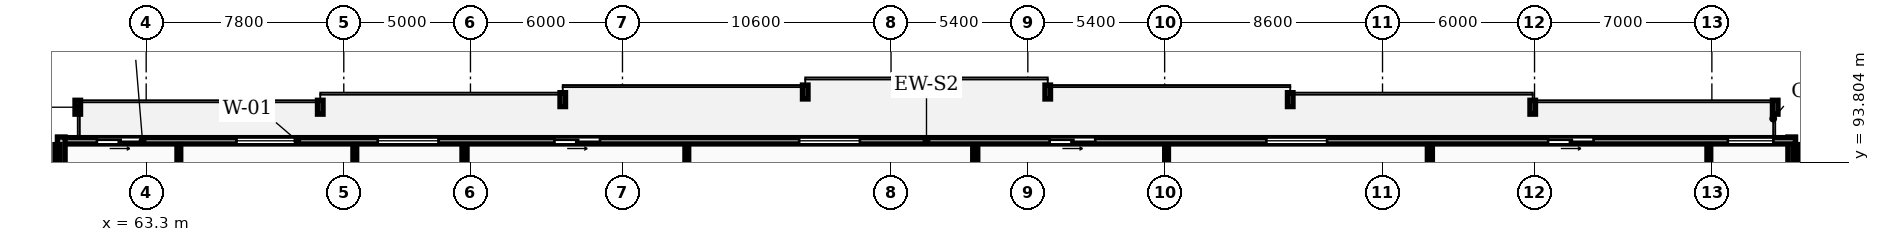
"""IFC4 building model, lengths in metres.
Left out: names, types, materials, properties, quantities, classifications, styles, units other than length and angle.
Written with IfcOpenShell. Run it as: python <this file> out.ifc"""

import sys

from ifc_helpers import new_model, si_unit, direction, frame, frame_2d, origin, place, context, subcontext, project, spatial, rectangle, extrude, element, fill, save


model = new_model("IFC4")
c1 = context("Model", 3, precision=1e-05, world=origin(), true_north=direction((0.0, 1.0)))
c2 = subcontext(c1, "Body", "Model", "MODEL_VIEW")
j1 = project(units=[si_unit("LENGTHUNIT", "METRE"), si_unit("PLANEANGLEUNIT", "RADIAN")], contexts=[c1])
p1 = place(None, origin())
s1 = spatial("IfcSite", under=j1, at=p1, CompositionType="ELEMENT")
p2 = place(p1, origin())
s2 = spatial("IfcBuilding", under=s1, at=p2, CompositionType="ELEMENT")
p3 = place(p2, frame((0.0, 0.0, 242.45)))
s3 = spatial("IfcBuildingStorey", under=s2, at=p3, CompositionType="ELEMENT", Elevation=242.45)
p4 = place(p3, frame((128.25, 91.2, 0.0), z_axis=(0.0, 0.0, 1.0), x_axis=(0.0, 1.0, 0.0)))
e1 = element("IfcWall", 1, at=p4, inside=s3, PredefinedType="STANDARD", context=c2, shape_type="SweptSolid", body=[
    extrude(rectangle(XDim=3.6, YDim=0.3, at=frame_2d((1.8, 0.0))), origin(), (0.0, 0.0, 1.0), 3.17),
])
p5 = place(p3, frame((128.4, 94.65, 0.0), z_axis=(0.0, 0.0, 1.0), x_axis=(-1.0, 0.0, 0.0)))
e2 = element("IfcWall", 2, at=p5, inside=s3, PredefinedType="STANDARD", context=c2, shape_type="SweptSolid", body=[
    extrude(rectangle(XDim=68.6, YDim=0.25, at=frame_2d((34.3, 0.0))), origin(), (0.0, 0.0, 1.0), 3.17),
])
p6 = place(p5, frame((59.137, 0.0, 0.85)))
e3 = element("IfcOpeningElement", 3, at=p6, cuts=e2, PredefinedType="OPENING", context=c2, shape_type="SweptSolid", body=[
    extrude(rectangle(XDim=2.4, YDim=1.9, at=frame_2d((1.2, 0.95))), frame((0.0, 0.135, 0.0), z_axis=(0.0, -1.0, 0.0), x_axis=(1.0, 0.0, 0.0)), (0.0, 0.0, 1.0), 0.27),
])
p7 = place(p5, frame((65.245, 0.0, 0.0)))
e4 = element("IfcOpeningElement", 4, at=p7, cuts=e2, PredefinedType="OPENING", context=c2, shape_type="SweptSolid", body=[
    extrude(rectangle(XDim=1.8, YDim=2.2, at=frame_2d((0.9, 1.1))), frame((0.0, 0.135, 0.0), z_axis=(0.0, -1.0, 0.0), x_axis=(1.0, 0.0, 0.0)), (0.0, 0.0, 1.0), 0.27),
])
p8 = place(p5, frame((53.56, 0.0, 0.85)))
e5 = element("IfcOpeningElement", 5, at=p8, cuts=e2, PredefinedType="OPENING", context=c2, shape_type="SweptSolid", body=[
    extrude(rectangle(XDim=2.4, YDim=1.9, at=frame_2d((1.2, 0.95))), frame((0.0, 0.135, 0.0), z_axis=(0.0, -1.0, 0.0), x_axis=(1.0, 0.0, 0.0)), (0.0, 0.0, 1.0), 0.27),
])
p9 = place(p5, frame((47.188, 0.0, 0.0)))
e6 = element("IfcOpeningElement", 6, at=p9, cuts=e2, PredefinedType="OPENING", context=c2, shape_type="SweptSolid", body=[
    extrude(rectangle(XDim=1.8, YDim=2.2, at=frame_2d((0.9, 1.1))), frame((0.0, 0.135, 0.0), z_axis=(0.0, -1.0, 0.0), x_axis=(1.0, 0.0, 0.0)), (0.0, 0.0, 1.0), 0.27),
])
p10 = place(p5, frame((36.928, 0.0, 0.85)))
e7 = element("IfcOpeningElement", 7, at=p10, cuts=e2, PredefinedType="OPENING", context=c2, shape_type="SweptSolid", body=[
    extrude(rectangle(XDim=2.4, YDim=1.9, at=frame_2d((1.2, 0.95))), frame((0.0, 0.135, 0.0), z_axis=(0.0, -1.0, 0.0), x_axis=(1.0, 0.0, 0.0)), (0.0, 0.0, 1.0), 0.27),
])
p11 = place(p5, frame((27.64, 0.0, 0.0)))
e8 = element("IfcOpeningElement", 8, at=p11, cuts=e2, PredefinedType="OPENING", context=c2, shape_type="SweptSolid", body=[
    extrude(rectangle(XDim=1.8, YDim=2.2, at=frame_2d((0.9, 1.1))), frame((0.0, 0.135, 0.0), z_axis=(0.0, -1.0, 0.0), x_axis=(1.0, 0.0, 0.0)), (0.0, 0.0, 1.0), 0.27),
])
p12 = place(p5, frame((18.487, 0.0, 0.85)))
e9 = element("IfcOpeningElement", 9, at=p12, cuts=e2, PredefinedType="OPENING", context=c2, shape_type="SweptSolid", body=[
    extrude(rectangle(XDim=2.4, YDim=1.9, at=frame_2d((1.2, 0.95))), frame((0.0, 0.135, 0.0), z_axis=(0.0, -1.0, 0.0), x_axis=(1.0, 0.0, 0.0)), (0.0, 0.0, 1.0), 0.27),
])
p13 = place(p5, frame((7.966, 0.0, 0.0)))
e10 = element("IfcOpeningElement", 10, at=p13, cuts=e2, PredefinedType="OPENING", context=c2, shape_type="SweptSolid", body=[
    extrude(rectangle(XDim=1.8, YDim=2.2, at=frame_2d((0.9, 1.1))), frame((0.0, 0.135, 0.0), z_axis=(0.0, -1.0, 0.0), x_axis=(1.0, 0.0, 0.0)), (0.0, 0.0, 1.0), 0.27),
])
p14 = place(p5, frame((0.87, 0.0, 0.85)))
e11 = element("IfcOpeningElement", 11, at=p14, cuts=e2, PredefinedType="OPENING", context=c2, shape_type="SweptSolid", body=[
    extrude(rectangle(XDim=1.8, YDim=1.8, at=frame_2d((0.9, 0.9))), frame((0.0, 0.135, 0.0), z_axis=(0.0, -1.0, 0.0), x_axis=(1.0, 0.0, 0.0)), (0.0, 0.0, 1.0), 0.27),
])
p15 = place(p3, frame((59.95, 94.8, 0.0), z_axis=(0.0, 0.0, 1.0), x_axis=(0.0, -1.0, 0.0)))
e12 = element("IfcWall", 12, at=p15, inside=s3, PredefinedType="STANDARD", context=c2, shape_type="SweptSolid", body=[
    extrude(rectangle(XDim=3.6, YDim=0.3, at=frame_2d((1.8, 0.0))), origin(), (0.0, 0.0, 1.0), 3.17),
])
for number, where, z_axis, x_axis in (
    (13, (59.8, 70.18, 0.0), (0.0, 0.0, 1.0), (0.0, 1.0, 0.0)),
    (14, (128.4, 70.18, 0.0), (0.0, 0.0, 1.0), (0.0, 1.0, 0.0)),
    (15, (75.865, 70.18, 0.0), (0.0, 0.0, 1.0), (0.0, 1.0, 0.0)),
):
    element("IfcWall", number, at=place(p3, frame(where, z_axis=z_axis, x_axis=x_axis)), inside=s3, PredefinedType="PARTITIONING", context=c2, shape_type="SweptSolid", body=[
        extrude(rectangle(XDim=24.32, YDim=0.2, at=frame_2d((12.16, 0.0))), origin(), (0.0, 0.0, 1.0), 2.477),
    ])
p16 = place(p3, frame((64.59, 84.54, 0.0), z_axis=(0.0, 0.0, 1.0), x_axis=(0.0, 1.0, 0.0)))
e16 = element("IfcWall", 16, at=p16, inside=s3, PredefinedType="PARTITIONING", context=c2, shape_type="SweptSolid", body=[
    extrude(rectangle(XDim=9.96, YDim=0.15, at=frame_2d((4.98, 0.0))), origin(), (0.0, 0.0, 1.0), 3.17),
])
p17 = place(p16, frame((3.82, 0.0, 0.0)))
e17 = element("IfcOpeningElement", 17, at=p17, cuts=e16, PredefinedType="OPENING", context=c2, shape_type="SweptSolid", body=[
    extrude(rectangle(XDim=0.92, YDim=2.08, at=frame_2d((0.46, 1.04))), frame((0.0, 0.085, 0.0), z_axis=(0.0, -1.0, 0.0), x_axis=(1.0, 0.0, 0.0)), (0.0, 0.0, 1.0), 0.17),
])
p18 = place(p3, frame((71.535, 87.16, 0.0), z_axis=(0.0, 0.0, 1.0), x_axis=(0.0, 1.0, 0.0)))
e18 = element("IfcWall", 18, at=p18, inside=s3, PredefinedType="PARTITIONING", context=c2, shape_type="SweptSolid", body=[
    extrude(rectangle(XDim=7.34, YDim=0.15, at=frame_2d((3.67, 0.0))), origin(), (0.0, 0.0, 1.0), 3.17),
])
p19 = place(p18, frame((1.2, 0.0, 0.0)))
e19 = element("IfcOpeningElement", 19, at=p19, cuts=e18, PredefinedType="OPENING", context=c2, shape_type="SweptSolid", body=[
    extrude(rectangle(XDim=0.92, YDim=2.08, at=frame_2d((0.46, 1.04))), frame((0.0, 0.085, 0.0), z_axis=(0.0, -1.0, 0.0), x_axis=(1.0, 0.0, 0.0)), (0.0, 0.0, 1.0), 0.17),
])
p20 = place(p3, frame((96.024, 70.18, 0.0), z_axis=(0.0, 0.0, 1.0), x_axis=(0.0, 1.0, 0.0)))
e20 = element("IfcWall", 20, at=p20, inside=s3, PredefinedType="PARTITIONING", context=c2, shape_type="SweptSolid", body=[
    extrude(rectangle(XDim=24.32, YDim=0.2, at=frame_2d((12.16, 0.0))), origin(), (0.0, 0.0, 1.0), 3.17),
])
p21 = place(p3, frame((84.64, 89.68, 0.0), z_axis=(0.0, 0.0, 1.0), x_axis=(0.0, 1.0, 0.0)))
e21 = element("IfcWall", 21, at=p21, inside=s3, PredefinedType="PARTITIONING", context=c2, shape_type="SweptSolid", body=[
    extrude(rectangle(XDim=4.82, YDim=0.15, at=frame_2d((2.41, 0.0))), origin(), (0.0, 0.0, 1.0), 2.477),
])
p22 = place(p3, frame((113.969, 70.18, 0.0), z_axis=(0.0, 0.0, 1.0), x_axis=(0.0, 1.0, 0.0)))
e22 = element("IfcWall", 22, at=p22, inside=s3, PredefinedType="PARTITIONING", context=c2, shape_type="SweptSolid", body=[
    extrude(rectangle(XDim=24.32, YDim=0.2, at=frame_2d((12.16, 0.0))), origin(), (0.0, 0.0, 1.0), 3.17),
])
p23 = place(p3, frame((103.576, 89.68, 0.0), z_axis=(0.0, 0.0, 1.0), x_axis=(0.0, 1.0, 0.0)))
e23 = element("IfcWall", 23, at=p23, inside=s3, PredefinedType="PARTITIONING", context=c2, shape_type="SweptSolid", body=[
    extrude(rectangle(XDim=4.82, YDim=0.15, at=frame_2d((2.41, 0.0))), origin(), (0.0, 0.0, 1.0), 3.17),
])
p24 = place(p3, frame((124.98, 84.54, 0.0), z_axis=(0.0, 0.0, 1.0), x_axis=(0.0, 1.0, 0.0)))
e24 = element("IfcWall", 24, at=p24, inside=s3, PredefinedType="PARTITIONING", context=c2, shape_type="SweptSolid", body=[
    extrude(rectangle(XDim=9.96, YDim=0.15, at=frame_2d((4.98, 0.0))), origin(), (0.0, 0.0, 1.0), 3.17),
])
p25 = place(p24, frame((1.43, 0.0, 0.0)))
e25 = element("IfcOpeningElement", 25, at=p25, cuts=e24, PredefinedType="OPENING", context=c2, shape_type="SweptSolid", body=[
    extrude(rectangle(XDim=0.84, YDim=2.04, at=frame_2d((0.42, 1.02))), frame((0.0, 0.085, 0.0), z_axis=(0.0, -1.0, 0.0), x_axis=(1.0, 0.0, 0.0)), (0.0, 0.0, 1.0), 0.17),
])
p26 = place(p24, frame((3.92, 0.0, 0.0)))
e26 = element("IfcOpeningElement", 26, at=p26, cuts=e24, PredefinedType="OPENING", context=c2, shape_type="SweptSolid", body=[
    extrude(rectangle(XDim=0.84, YDim=2.04, at=frame_2d((0.42, 1.02))), frame((0.0, 0.085, 0.0), z_axis=(0.0, -1.0, 0.0), x_axis=(1.0, 0.0, 0.0)), (0.0, 0.0, 1.0), 0.17),
])
p27 = place(p24, frame((5.48, 0.0, 0.0)))
e27 = element("IfcOpeningElement", 27, at=p27, cuts=e24, PredefinedType="OPENING", context=c2, shape_type="SweptSolid", body=[
    extrude(rectangle(XDim=0.88, YDim=2.06, at=frame_2d((0.44, 1.03))), frame((0.0, 0.085, 0.0), z_axis=(0.0, -1.0, 0.0), x_axis=(1.0, 0.0, 0.0)), (0.0, 0.0, 1.0), 0.17),
])
p28 = place(p6, origin())
e28 = element("IfcWindow", 28, at=p28, inside=s3, PartitioningType="DOUBLE_PANEL_VERTICAL", PredefinedType="WINDOW", context=c2, shape_type="SweptSolid", body=[
    extrude(rectangle(XDim=2.4, YDim=1.9, at=frame_2d((1.2, 0.95))), frame((0.0, 0.03, 0.0), z_axis=(0.0, -1.0, 0.0), x_axis=(1.0, 0.0, 0.0)), (0.0, 0.0, 1.0), 0.06),
])
fill(e3, e28)
p29 = place(p7, origin())
e29 = element("IfcDoor", 29, at=p29, inside=s3, OperationType="SLIDING_TO_LEFT", PredefinedType="DOOR", context=c2, shape_type="SweptSolid", body=[
    extrude(rectangle(XDim=1.8, YDim=2.2, at=frame_2d((0.9, 1.1))), frame((0.0, 0.025, 0.0), z_axis=(0.0, -1.0, 0.0), x_axis=(1.0, 0.0, 0.0)), (0.0, 0.0, 1.0), 0.05),
])
fill(e4, e29)
p30 = place(p8, origin())
e30 = element("IfcWindow", 30, at=p30, inside=s3, PartitioningType="DOUBLE_PANEL_VERTICAL", PredefinedType="WINDOW", context=c2, shape_type="SweptSolid", body=[
    extrude(rectangle(XDim=2.4, YDim=1.9, at=frame_2d((1.2, 0.95))), frame((0.0, 0.03, 0.0), z_axis=(0.0, -1.0, 0.0), x_axis=(1.0, 0.0, 0.0)), (0.0, 0.0, 1.0), 0.06),
])
fill(e5, e30)
p31 = place(p9, origin())
e31 = element("IfcDoor", 31, at=p31, inside=s3, OperationType="SLIDING_TO_LEFT", PredefinedType="DOOR", context=c2, shape_type="SweptSolid", body=[
    extrude(rectangle(XDim=1.8, YDim=2.2, at=frame_2d((0.9, 1.1))), frame((0.0, 0.025, 0.0), z_axis=(0.0, -1.0, 0.0), x_axis=(1.0, 0.0, 0.0)), (0.0, 0.0, 1.0), 0.05),
])
fill(e6, e31)
p32 = place(p10, origin())
e32 = element("IfcWindow", 32, at=p32, inside=s3, PartitioningType="DOUBLE_PANEL_VERTICAL", PredefinedType="WINDOW", context=c2, shape_type="SweptSolid", body=[
    extrude(rectangle(XDim=2.4, YDim=1.9, at=frame_2d((1.2, 0.95))), frame((0.0, 0.03, 0.0), z_axis=(0.0, -1.0, 0.0), x_axis=(1.0, 0.0, 0.0)), (0.0, 0.0, 1.0), 0.06),
])
fill(e7, e32)
p33 = place(p11, origin())
e33 = element("IfcDoor", 33, at=p33, inside=s3, OperationType="SLIDING_TO_LEFT", PredefinedType="DOOR", context=c2, shape_type="SweptSolid", body=[
    extrude(rectangle(XDim=1.8, YDim=2.2, at=frame_2d((0.9, 1.1))), frame((0.0, 0.025, 0.0), z_axis=(0.0, -1.0, 0.0), x_axis=(1.0, 0.0, 0.0)), (0.0, 0.0, 1.0), 0.05),
])
fill(e8, e33)
p34 = place(p12, origin())
e34 = element("IfcWindow", 34, at=p34, inside=s3, PartitioningType="DOUBLE_PANEL_VERTICAL", PredefinedType="WINDOW", context=c2, shape_type="SweptSolid", body=[
    extrude(rectangle(XDim=2.4, YDim=1.9, at=frame_2d((1.2, 0.95))), frame((0.0, 0.03, 0.0), z_axis=(0.0, -1.0, 0.0), x_axis=(1.0, 0.0, 0.0)), (0.0, 0.0, 1.0), 0.06),
])
fill(e9, e34)
p35 = place(p13, origin())
e35 = element("IfcDoor", 35, at=p35, inside=s3, OperationType="SLIDING_TO_LEFT", PredefinedType="DOOR", context=c2, shape_type="SweptSolid", body=[
    extrude(rectangle(XDim=1.8, YDim=2.2, at=frame_2d((0.9, 1.1))), frame((0.0, 0.025, 0.0), z_axis=(0.0, -1.0, 0.0), x_axis=(1.0, 0.0, 0.0)), (0.0, 0.0, 1.0), 0.05),
])
fill(e10, e35)
p36 = place(p14, origin())
e36 = element("IfcWindow", 36, at=p36, inside=s3, PartitioningType="SINGLE_PANEL", PredefinedType="WINDOW", context=c2, shape_type="SweptSolid", body=[
    extrude(rectangle(XDim=1.8, YDim=1.8, at=frame_2d((0.9, 0.9))), frame((0.0, 0.03, 0.0), z_axis=(0.0, -1.0, 0.0), x_axis=(1.0, 0.0, 0.0)), (0.0, 0.0, 1.0), 0.06),
])
fill(e11, e36)
save(model, sys.argv[1])
